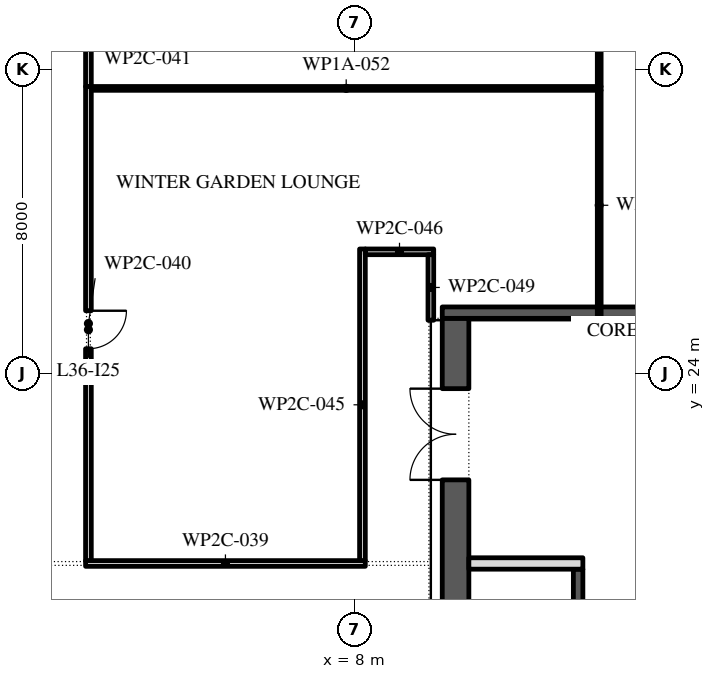
"""IFC4 building model, lengths in metres.
Left out: names, types, materials, properties, quantities, classifications, styles, units other than length and angle.
Written with IfcOpenShell. Run it as: python <this file> out.ifc"""

import sys

from ifc_helpers import new_model, si_unit, direction, frame, frame_2d, origin, place, context, subcontext, project, spatial, rectangle, extrude, element, fill, save


model = new_model("IFC4")
c1 = context("Model", 3, precision=1e-05, world=origin(), true_north=direction((0.0, 1.0)))
c2 = subcontext(c1, "Body", "Model", "MODEL_VIEW")
j1 = project(units=[si_unit("LENGTHUNIT", "METRE"), si_unit("PLANEANGLEUNIT", "RADIAN")], contexts=[c1])
p1 = place(None, origin())
s1 = spatial("IfcSite", under=j1, at=p1, CompositionType="ELEMENT")
p2 = place(p1, origin())
s2 = spatial("IfcBuilding", under=s1, at=p2, CompositionType="ELEMENT")
p3 = place(p2, frame((0.0, 0.0, 165.6)))
s3 = spatial("IfcBuildingStorey", under=s2, at=p3, CompositionType="ELEMENT", Elevation=165.6)
p4 = place(p3, frame((10.65, -2.45, 0.0), z_axis=(0.0, 0.0, 1.0), x_axis=(0.0, 1.0, 0.0)))
e1 = element("IfcWall", 1, at=p4, inside=s3, PredefinedType="SHEAR", context=c2, shape_type="SweptSolid", body=[
    extrude(rectangle(XDim=27.9, YDim=0.7, at=frame_2d((13.95, 0.0))), origin(), (0.0, 0.0, 1.0), 5.8),
])
p5 = place(p4, frame((23.65, 0.0, 0.0)))
e2 = element("IfcOpeningElement", 2, at=p5, cuts=e1, PredefinedType="OPENING", context=c2, shape_type="SweptSolid", body=[
    extrude(rectangle(XDim=2.4, YDim=2.1, at=frame_2d((1.2, 1.05))), frame((0.0, 0.36, 0.0), z_axis=(0.0, -1.0, 0.0), x_axis=(1.0, 0.0, 0.0)), (0.0, 0.0, 1.0), 0.72),
])
p6 = place(p4, frame((1.087, 0.0, 0.0)))
e3 = element("IfcOpeningElement", 3, at=p6, cuts=e1, PredefinedType="OPENING", context=c2, shape_type="SweptSolid", body=[
    extrude(rectangle(XDim=0.9, YDim=2.1, at=frame_2d((0.45, 1.05))), frame((0.0, 0.36, 0.0), z_axis=(0.0, -1.0, 0.0), x_axis=(1.0, 0.0, 0.0)), (0.0, 0.0, 1.0), 0.72),
])
p7 = place(p4, frame((4.262, 0.0, 0.0)))
e4 = element("IfcOpeningElement", 4, at=p7, cuts=e1, PredefinedType="OPENING", context=c2, shape_type="SweptSolid", body=[
    extrude(rectangle(XDim=1.0, YDim=2.1, at=frame_2d((0.5, 1.05))), frame((0.0, 0.36, 0.0), z_axis=(0.0, -1.0, 0.0), x_axis=(1.0, 0.0, 0.0)), (0.0, 0.0, 1.0), 0.72),
])
p8 = place(p3, frame((10.3, 25.6, 0.0), z_axis=(0.0, 0.0, 1.0), x_axis=(1.0, 0.0, 0.0)))
e5 = element("IfcWall", 5, at=p8, inside=s3, PredefinedType="SHEAR", context=c2, shape_type="SweptSolid", body=[
    extrude(rectangle(XDim=11.4, YDim=0.3, at=frame_2d((5.7, 0.0))), origin(), (0.0, 0.0, 1.0), 5.8),
])
p9 = place(p3, frame((13.875, -2.45, 0.0), z_axis=(0.0, 0.0, 1.0), x_axis=(0.0, 1.0, 0.0)))
e6 = element("IfcWall", 6, at=p9, inside=s3, PredefinedType="SHEAR", context=c2, shape_type="SweptSolid", body=[
    extrude(rectangle(XDim=21.3, YDim=0.25, at=frame_2d((10.65, 0.0))), origin(), (0.0, 0.0, 1.0), 5.8),
])
p10 = place(p9, frame((17.786, 0.0, 0.0)))
e7 = element("IfcOpeningElement", 7, at=p10, cuts=e6, PredefinedType="OPENING", context=c2, shape_type="SweptSolid", body=[
    extrude(rectangle(XDim=0.9, YDim=2.1, at=frame_2d((0.45, 1.05))), frame((0.0, 0.135, 0.0), z_axis=(0.0, -1.0, 0.0), x_axis=(1.0, 0.0, 0.0)), (0.0, 0.0, 1.0), 0.27),
])
p11 = place(p9, frame((6.971, 0.0, 0.0)))
e8 = element("IfcOpeningElement", 8, at=p11, cuts=e6, PredefinedType="OPENING", context=c2, shape_type="SweptSolid", body=[
    extrude(rectangle(XDim=1.1, YDim=2.1, at=frame_2d((0.55, 1.05))), frame((0.0, 0.135, 0.0), z_axis=(0.0, -1.0, 0.0), x_axis=(1.0, 0.0, 0.0)), (0.0, 0.0, 1.0), 0.27),
])
p12 = place(p9, frame((9.114, 0.0, 0.0)))
e9 = element("IfcOpeningElement", 9, at=p12, cuts=e6, PredefinedType="OPENING", context=c2, shape_type="SweptSolid", body=[
    extrude(rectangle(XDim=1.1, YDim=2.1, at=frame_2d((0.55, 1.05))), frame((0.0, 0.135, 0.0), z_axis=(0.0, -1.0, 0.0), x_axis=(1.0, 0.0, 0.0)), (0.0, 0.0, 1.0), 0.27),
])
p13 = place(p9, frame((11.257, 0.0, 0.0)))
e10 = element("IfcOpeningElement", 10, at=p13, cuts=e6, PredefinedType="OPENING", context=c2, shape_type="SweptSolid", body=[
    extrude(rectangle(XDim=1.1, YDim=2.1, at=frame_2d((0.55, 1.05))), frame((0.0, 0.135, 0.0), z_axis=(0.0, -1.0, 0.0), x_axis=(1.0, 0.0, 0.0)), (0.0, 0.0, 1.0), 0.27),
])
p14 = place(p9, frame((13.4, 0.0, 0.0)))
e11 = element("IfcOpeningElement", 11, at=p14, cuts=e6, PredefinedType="OPENING", context=c2, shape_type="SweptSolid", body=[
    extrude(rectangle(XDim=1.1, YDim=2.1, at=frame_2d((0.55, 1.05))), frame((0.0, 0.135, 0.0), z_axis=(0.0, -1.0, 0.0), x_axis=(1.0, 0.0, 0.0)), (0.0, 0.0, 1.0), 0.27),
])
p15 = place(p3, frame((11.0, 19.0, 0.0), z_axis=(0.0, 0.0, 1.0), x_axis=(1.0, 0.0, 0.0)))
e12 = element("IfcWall", 12, at=p15, inside=s3, PredefinedType="PARTITIONING", context=c2, shape_type="SweptSolid", body=[
    extrude(rectangle(XDim=3.0, YDim=0.3, at=frame_2d((1.5, 0.0))), origin(), (0.0, 0.0, 1.0), 5.8),
])
p16 = place(p3, frame((0.915, 19.0, 0.0), z_axis=(0.0, 0.0, 1.0), x_axis=(1.0, 0.0, 0.0)))
e13 = element("IfcWall", 13, at=p16, inside=s3, PredefinedType="PARTITIONING", context=c2, shape_type="SweptSolid", body=[
    extrude(rectangle(XDim=7.36, YDim=0.15, at=frame_2d((3.68, 0.0))), origin(), (0.0, 0.0, 1.0), 5.8),
])
p17 = place(p3, frame((0.99, 31.55, 0.0), z_axis=(0.0, 0.0, 1.0), x_axis=(0.0, -1.0, 0.0)))
e14 = element("IfcWall", 14, at=p17, inside=s3, PredefinedType="PARTITIONING", context=c2, shape_type="SweptSolid", body=[
    extrude(rectangle(XDim=12.475, YDim=0.15, at=frame_2d((6.238, 0.0))), origin(), (0.0, 0.0, 1.0), 5.8),
])
p18 = place(p17, frame((5.9, 0.0, 0.0)))
e15 = element("IfcOpeningElement", 15, at=p18, cuts=e14, PredefinedType="OPENING", context=c2, shape_type="SweptSolid", body=[
    extrude(rectangle(XDim=1.0, YDim=2.1, at=frame_2d((0.5, 1.05))), frame((0.0, 0.085, 0.0), z_axis=(0.0, -1.0, 0.0), x_axis=(1.0, 0.0, 0.0)), (0.0, 0.0, 1.0), 0.17),
])
p19 = place(p3, frame((0.99, 36.12, 0.0), z_axis=(0.0, 0.0, 1.0), x_axis=(0.0, -1.0, 0.0)))
e16 = element("IfcWall", 16, at=p19, inside=s3, PredefinedType="PARTITIONING", context=c2, shape_type="SweptSolid", body=[
    extrude(rectangle(XDim=4.57, YDim=0.15, at=frame_2d((2.285, 0.0))), origin(), (0.0, 0.0, 1.0), 5.8),
])
p20 = place(p19, frame((2.22, 0.0, 0.0)))
e17 = element("IfcOpeningElement", 17, at=p20, cuts=e16, PredefinedType="OPENING", context=c2, shape_type="SweptSolid", body=[
    extrude(rectangle(XDim=1.0, YDim=2.1, at=frame_2d((0.5, 1.05))), frame((0.0, 0.085, 0.0), z_axis=(0.0, -1.0, 0.0), x_axis=(1.0, 0.0, 0.0)), (0.0, 0.0, 1.0), 0.17),
])
p21 = place(p3, frame((8.2, 19.075, 0.0), z_axis=(0.0, 0.0, 1.0), x_axis=(0.0, 1.0, 0.0)))
e18 = element("IfcWall", 18, at=p21, inside=s3, PredefinedType="PARTITIONING", context=c2, shape_type="SweptSolid", body=[
    extrude(rectangle(XDim=8.2, YDim=0.15, at=frame_2d((4.1, 0.0))), origin(), (0.0, 0.0, 1.0), 5.8),
])
p22 = place(p3, frame((8.275, 27.2, 0.0), z_axis=(0.0, 0.0, 1.0), x_axis=(1.0, 0.0, 0.0)))
e19 = element("IfcWall", 19, at=p22, inside=s3, PredefinedType="PARTITIONING", context=c2, shape_type="SweptSolid", body=[
    extrude(rectangle(XDim=1.8, YDim=0.15, at=frame_2d((0.9, 0.0))), origin(), (0.0, 0.0, 1.0), 5.8),
])
p23 = place(p3, frame((10.0, 27.125, 0.0), z_axis=(0.0, 0.0, 1.0), x_axis=(0.0, -1.0, 0.0)))
e20 = element("IfcWall", 20, at=p23, inside=s3, PredefinedType="PARTITIONING", context=c2, shape_type="SweptSolid", body=[
    extrude(rectangle(XDim=1.725, YDim=0.15, at=frame_2d((0.863, 0.0))), origin(), (0.0, 0.0, 1.0), 5.8),
])
p24 = place(p3, frame((14.48, 31.5, 0.0), z_axis=(0.0, 0.0, 1.0), x_axis=(-1.0, 0.0, 0.0)))
e21 = element("IfcWall", 21, at=p24, inside=s3, PredefinedType="PARTITIONING", context=c2, shape_type="SweptSolid", body=[
    extrude(rectangle(XDim=13.415, YDim=0.1, at=frame_2d((6.708, 0.0))), origin(), (0.0, 0.0, 1.0), 5.8),
])
p25 = place(p3, frame((14.43, 31.45, 0.0), z_axis=(0.0, 0.0, 1.0), x_axis=(0.0, -1.0, 0.0)))
e22 = element("IfcWall", 22, at=p25, inside=s3, PredefinedType="PARTITIONING", context=c2, shape_type="SweptSolid", body=[
    extrude(rectangle(XDim=6.05, YDim=0.1, at=frame_2d((3.025, 0.0))), origin(), (0.0, 0.0, 1.0), 5.8),
])
p26 = place(p3, frame((14.43, 36.12, 0.0), z_axis=(0.0, 0.0, 1.0), x_axis=(0.0, -1.0, 0.0)))
e23 = element("IfcWall", 23, at=p26, inside=s3, PredefinedType="PARTITIONING", context=c2, shape_type="SweptSolid", body=[
    extrude(rectangle(XDim=4.57, YDim=0.1, at=frame_2d((2.285, 0.0))), origin(), (0.0, 0.0, 1.0), 5.8),
])
p27 = place(p5, origin())
e24 = element("IfcDoor", 24, at=p27, inside=s3, OperationType="DOUBLE_DOOR_SINGLE_SWING", PredefinedType="DOOR", context=c2, shape_type="SweptSolid", body=[
    extrude(rectangle(XDim=2.4, YDim=2.1, at=frame_2d((1.2, 1.05))), frame((0.0, 0.025, 0.0), z_axis=(0.0, -1.0, 0.0), x_axis=(1.0, 0.0, 0.0)), (0.0, 0.0, 1.0), 0.05),
])
fill(e2, e24)
p28 = place(p18, origin())
e25 = element("IfcDoor", 25, at=p28, inside=s3, OperationType="SINGLE_SWING_RIGHT", PredefinedType="DOOR", context=c2, shape_type="SweptSolid", body=[
    extrude(rectangle(XDim=1.0, YDim=2.1, at=frame_2d((0.5, 1.05))), frame((0.0, 0.025, 0.0), z_axis=(0.0, -1.0, 0.0), x_axis=(1.0, 0.0, 0.0)), (0.0, 0.0, 1.0), 0.05),
])
fill(e15, e25)
save(model, sys.argv[1])
